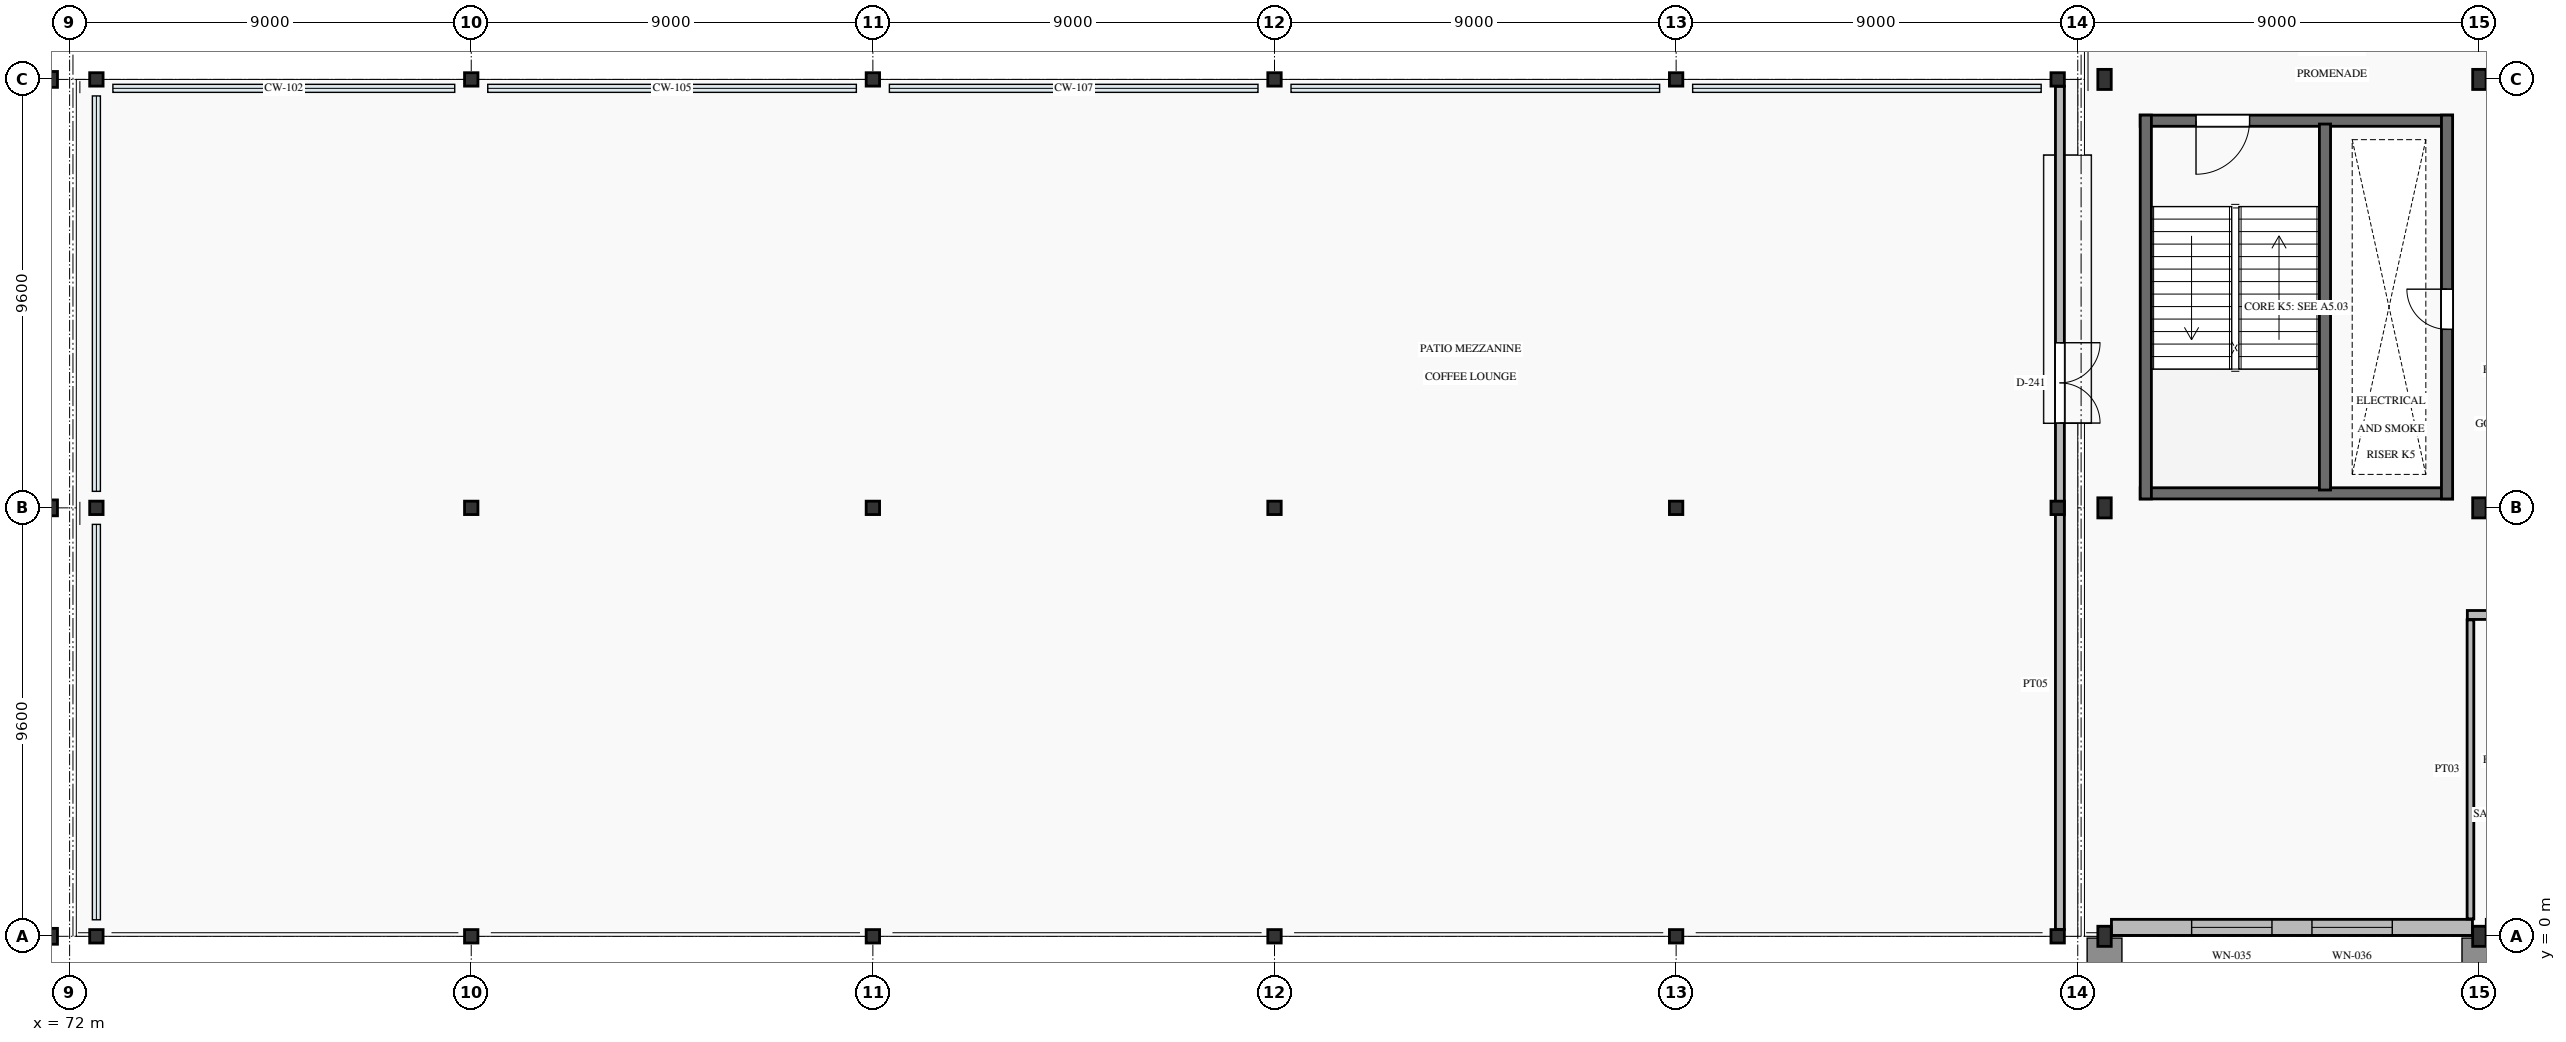
"""IFC4 building model, lengths in metres.
Left out: names, types, materials, properties, quantities, classifications, styles, units other than length and angle.
Written with IfcOpenShell. Run it as: python <this file> out.ifc"""

import sys

from ifc_helpers import new_model, si_unit, direction, frame, frame_2d, origin, origin_2d, place, context, subcontext, project, spatial, rectangle, hollow_circle, i_section, extrude, element, fill, save


model = new_model("IFC4")
c1 = context("Model", 3, precision=1e-05, world=origin(), true_north=direction((0.0, 1.0)))
c2 = subcontext(c1, "Body", "Model", "MODEL_VIEW")
j1 = project(units=[si_unit("LENGTHUNIT", "METRE"), si_unit("PLANEANGLEUNIT", "RADIAN")], contexts=[c1])
p1 = place(None, origin())
s1 = spatial("IfcSite", under=j1, at=p1, CompositionType="ELEMENT")
p2 = place(p1, origin())
s2 = spatial("IfcBuilding", under=s1, at=p2, CompositionType="ELEMENT")
p3 = place(p2, frame((0.0, 0.0, 6.0)))
s3 = spatial("IfcBuildingStorey", under=s2, at=p3, CompositionType="ELEMENT", Elevation=6.0)
for number, where, z_axis, x_axis in (
    (1, (71.55, 0.0, 0.0), (0.0, 0.0, 1.0), (1.0, 0.0, 0.0)),
    (2, (71.55, 9.6, 0.0), (0.0, 0.0, 1.0), (1.0, 0.0, 0.0)),
    (3, (71.55, 19.2, 0.0), (0.0, 0.0, 1.0), (1.0, 0.0, 0.0)),
):
    element("IfcColumn", number, at=place(p3, frame(where, z_axis=z_axis, x_axis=x_axis)), inside=s3, PredefinedType="COLUMN", context=c2, shape_type="SweptSolid", body=[
        extrude(hollow_circle(Radius=0.178, WallThickness=0.02, at=origin_2d()), origin(), (0.0, 0.0, 1.0), 4.68),
    ])
for number, where, z_axis, x_axis in (
    (4, (72.6, 0.0, 0.0), (0.0, 0.0, 1.0), (1.0, 0.0, 0.0)),
    (5, (72.6, 9.6, 0.0), (0.0, 0.0, 1.0), (1.0, 0.0, 0.0)),
    (6, (72.6, 19.2, 0.0), (0.0, 0.0, 1.0), (1.0, 0.0, 0.0)),
    (7, (81.0, 0.0, 0.0), (0.0, 0.0, 1.0), (1.0, 0.0, 0.0)),
    (8, (81.0, 9.6, 0.0), (0.0, 0.0, 1.0), (1.0, 0.0, 0.0)),
    (9, (81.0, 19.2, 0.0), (0.0, 0.0, 1.0), (1.0, 0.0, 0.0)),
    (10, (90.0, 0.0, 0.0), (0.0, 0.0, 1.0), (1.0, 0.0, 0.0)),
    (11, (90.0, 9.6, 0.0), (0.0, 0.0, 1.0), (1.0, 0.0, 0.0)),
    (12, (90.0, 19.2, 0.0), (0.0, 0.0, 1.0), (1.0, 0.0, 0.0)),
    (13, (99.0, 0.0, 0.0), (0.0, 0.0, 1.0), (1.0, 0.0, 0.0)),
    (14, (99.0, 9.6, 0.0), (0.0, 0.0, 1.0), (1.0, 0.0, 0.0)),
    (15, (99.0, 19.2, 0.0), (0.0, 0.0, 1.0), (1.0, 0.0, 0.0)),
    (16, (108.0, 0.0, 0.0), (0.0, 0.0, 1.0), (1.0, 0.0, 0.0)),
    (17, (108.0, 9.6, 0.0), (0.0, 0.0, 1.0), (1.0, 0.0, 0.0)),
    (18, (108.0, 19.2, 0.0), (0.0, 0.0, 1.0), (1.0, 0.0, 0.0)),
    (19, (116.55, 0.0, 0.0), (0.0, 0.0, 1.0), (1.0, 0.0, 0.0)),
    (20, (116.55, 9.6, 0.0), (0.0, 0.0, 1.0), (1.0, 0.0, 0.0)),
    (21, (116.55, 19.2, 0.0), (0.0, 0.0, 1.0), (1.0, 0.0, 0.0)),
):
    element("IfcColumn", number, at=place(p3, frame(where, z_axis=z_axis, x_axis=x_axis)), inside=s3, PredefinedType="COLUMN", context=c2, shape_type="SweptSolid", body=[
        extrude(i_section(OverallWidth=0.3, OverallDepth=0.3, WebThickness=0.011, FlangeThickness=0.019, FilletRadius=0.027, at=origin_2d()), origin(), (0.0, 0.0, 1.0), 4.8),
    ])
for number, where, z_axis, x_axis in (
    (22, (117.6, 0.0, 0.0), (0.0, 0.0, 1.0), (1.0, 0.0, 0.0)),
    (23, (117.6, 9.6, 0.0), (0.0, 0.0, 1.0), (1.0, 0.0, 0.0)),
    (24, (117.6, 19.2, 0.0), (0.0, 0.0, 1.0), (1.0, 0.0, 0.0)),
    (25, (126.0, 0.0, 0.0), (0.0, 0.0, 1.0), (1.0, 0.0, 0.0)),
    (26, (126.0, 9.6, 0.0), (0.0, 0.0, 1.0), (1.0, 0.0, 0.0)),
    (27, (126.0, 19.2, 0.0), (0.0, 0.0, 1.0), (1.0, 0.0, 0.0)),
):
    element("IfcColumn", number, at=place(p3, frame(where, z_axis=z_axis, x_axis=x_axis)), inside=s3, PredefinedType="COLUMN", context=c2, shape_type="SweptSolid", body=[
        extrude(i_section(OverallWidth=0.3, OverallDepth=0.45, WebThickness=0.014, FlangeThickness=0.026, FilletRadius=0.027, at=origin_2d()), origin(), (0.0, 0.0, 1.0), 4.8),
    ])
p4 = place(p3, frame((117.755, 0.2, 0.0), z_axis=(0.0, 0.0, 1.0), x_axis=(1.0, 0.0, 0.0)))
e28 = element("IfcWall", 28, at=p4, inside=s3, PredefinedType="SOLIDWALL", context=c2, shape_type="SweptSolid", body=[
    extrude(rectangle(XDim=8.09, YDim=0.36, at=frame_2d((4.045, 0.0))), origin(), (0.0, 0.0, 1.0), 4.23),
])
p5 = place(p4, frame((1.797, 0.0, 0.95)))
e29 = element("IfcOpeningElement", 29, at=p5, cuts=e28, PredefinedType="OPENING", context=c2, shape_type="SweptSolid", body=[
    extrude(rectangle(XDim=1.8, YDim=2.2, at=frame_2d((0.9, 1.1))), frame((0.0, 0.195, 0.0), z_axis=(0.0, -1.0, 0.0), x_axis=(1.0, 0.0, 0.0)), (0.0, 0.0, 1.0), 0.39),
])
p6 = place(p4, frame((4.493, 0.0, 0.95)))
e30 = element("IfcOpeningElement", 30, at=p6, cuts=e28, PredefinedType="OPENING", context=c2, shape_type="SweptSolid", body=[
    extrude(rectangle(XDim=1.8, YDim=2.2, at=frame_2d((0.9, 1.1))), frame((0.0, 0.195, 0.0), z_axis=(0.0, -1.0, 0.0), x_axis=(1.0, 0.0, 0.0)), (0.0, 0.0, 1.0), 0.39),
])
p7 = place(p3, frame((118.4, 9.925, 0.0), z_axis=(0.0, 0.0, 1.0), x_axis=(1.0, 0.0, 0.0)))
e31 = element("IfcWall", 31, at=p7, inside=s3, PredefinedType="SHEAR", context=c2, shape_type="SweptSolid", body=[
    extrude(rectangle(XDim=7.0, YDim=0.25, at=frame_2d((3.5, 0.0))), origin(), (0.0, 0.0, 1.0), 4.8),
])
p8 = place(p3, frame((118.4, 18.275, 0.0), z_axis=(0.0, 0.0, 1.0), x_axis=(1.0, 0.0, 0.0)))
e32 = element("IfcWall", 32, at=p8, inside=s3, PredefinedType="SHEAR", context=c2, shape_type="SweptSolid", body=[
    extrude(rectangle(XDim=7.0, YDim=0.25, at=frame_2d((3.5, 0.0))), origin(), (0.0, 0.0, 1.0), 4.8),
])
p9 = place(p8, frame((1.25, 0.0, 0.0)))
e33 = element("IfcOpeningElement", 33, at=p9, cuts=e32, PredefinedType="OPENING", context=c2, shape_type="SweptSolid", body=[
    extrude(rectangle(XDim=1.2, YDim=2.15, at=frame_2d((0.6, 1.075))), frame((0.0, 0.14, 0.0), z_axis=(0.0, -1.0, 0.0), x_axis=(1.0, 0.0, 0.0)), (0.0, 0.0, 1.0), 0.28),
])
p10 = place(p3, frame((118.525, 9.8, 0.0), z_axis=(0.0, 0.0, 1.0), x_axis=(0.0, 1.0, 0.0)))
e34 = element("IfcWall", 34, at=p10, inside=s3, PredefinedType="SHEAR", context=c2, shape_type="SweptSolid", body=[
    extrude(rectangle(XDim=8.6, YDim=0.25, at=frame_2d((4.3, 0.0))), origin(), (0.0, 0.0, 1.0), 4.8),
])
p11 = place(p3, frame((125.275, 9.8, 0.0), z_axis=(0.0, 0.0, 1.0), x_axis=(0.0, 1.0, 0.0)))
e35 = element("IfcWall", 35, at=p11, inside=s3, PredefinedType="SHEAR", context=c2, shape_type="SweptSolid", body=[
    extrude(rectangle(XDim=8.6, YDim=0.25, at=frame_2d((4.3, 0.0))), origin(), (0.0, 0.0, 1.0), 4.8),
])
p12 = place(p11, frame((3.8, 0.0, 0.0)))
e36 = element("IfcOpeningElement", 36, at=p12, cuts=e35, PredefinedType="OPENING", context=c2, shape_type="SweptSolid", body=[
    extrude(rectangle(XDim=0.9, YDim=2.05, at=frame_2d((0.45, 1.025))), frame((0.0, 0.14, 0.0), z_axis=(0.0, -1.0, 0.0), x_axis=(1.0, 0.0, 0.0)), (0.0, 0.0, 1.0), 0.28),
])
p13 = place(p3, frame((122.54, 10.0, 0.0), z_axis=(0.0, 0.0, 1.0), x_axis=(0.0, 1.0, 0.0)))
e37 = element("IfcWall", 37, at=p13, inside=s3, PredefinedType="SHEAR", context=c2, shape_type="SweptSolid", body=[
    extrude(rectangle(XDim=8.2, YDim=0.25, at=frame_2d((4.1, 0.0))), origin(), (0.0, 0.0, 1.0), 4.8),
])
p14 = place(p3, frame((116.6, 0.155, 0.0), z_axis=(0.0, 0.0, 1.0), x_axis=(0.0, 1.0, 0.0)))
e38 = element("IfcWall", 38, at=p14, inside=s3, PredefinedType="PARTITIONING", context=c2, shape_type="SweptSolid", body=[
    extrude(rectangle(XDim=18.89, YDim=0.2, at=frame_2d((9.445, 0.0))), origin(), (0.0, 0.0, 1.0), 4.215),
])
p15 = place(p14, frame((11.345, 0.0, 0.0)))
e39 = element("IfcOpeningElement", 39, at=p15, cuts=e38, PredefinedType="OPENING", context=c2, shape_type="SweptSolid", body=[
    extrude(rectangle(XDim=1.8, YDim=2.3, at=frame_2d((0.9, 1.15))), frame((0.0, 0.115, 0.0), z_axis=(0.0, -1.0, 0.0), x_axis=(1.0, 0.0, 0.0)), (0.0, 0.0, 1.0), 0.23),
])
p16 = place(p3, frame((125.73, 7.2, 0.0), z_axis=(0.0, 0.0, 1.0), x_axis=(1.0, 0.0, 0.0)))
e40 = element("IfcWall", 40, at=p16, inside=s3, PredefinedType="PARTITIONING", context=c2, shape_type="SweptSolid", body=[
    extrude(rectangle(XDim=4.35, YDim=0.2, at=frame_2d((2.175, 0.0))), origin(), (0.0, 0.0, 1.0), 4.53),
])
p17 = place(p16, frame((1.695, 0.0, 0.0)))
e41 = element("IfcOpeningElement", 41, at=p17, cuts=e40, PredefinedType="OPENING", context=c2, shape_type="SweptSolid", body=[
    extrude(rectangle(XDim=0.95, YDim=2.1, at=frame_2d((0.475, 1.05))), frame((0.0, 0.115, 0.0), z_axis=(0.0, -1.0, 0.0), x_axis=(1.0, 0.0, 0.0)), (0.0, 0.0, 1.0), 0.23),
])
p18 = place(p3, frame((125.8, 0.39, 0.0), z_axis=(0.0, 0.0, 1.0), x_axis=(0.0, 1.0, 0.0)))
e42 = element("IfcWall", 42, at=p18, inside=s3, PredefinedType="PARTITIONING", context=c2, shape_type="SweptSolid", body=[
    extrude(rectangle(XDim=6.7, YDim=0.15, at=frame_2d((3.35, 0.0))), origin(), (0.0, 0.0, 1.0), 3.93),
])
p19 = place(p5, origin())
e43 = element("IfcWindow", 43, at=p19, inside=s3, PartitioningType="SINGLE_PANEL", PredefinedType="WINDOW", context=c2, shape_type="SweptSolid", body=[
    extrude(rectangle(XDim=1.8, YDim=2.2, at=frame_2d((0.9, 1.1))), frame((0.0, 0.03, 0.0), z_axis=(0.0, -1.0, 0.0), x_axis=(1.0, 0.0, 0.0)), (0.0, 0.0, 1.0), 0.06),
])
fill(e29, e43)
p20 = place(p6, origin())
e44 = element("IfcWindow", 44, at=p20, inside=s3, PartitioningType="SINGLE_PANEL", PredefinedType="WINDOW", context=c2, shape_type="SweptSolid", body=[
    extrude(rectangle(XDim=1.8, YDim=2.2, at=frame_2d((0.9, 1.1))), frame((0.0, 0.03, 0.0), z_axis=(0.0, -1.0, 0.0), x_axis=(1.0, 0.0, 0.0)), (0.0, 0.0, 1.0), 0.06),
])
fill(e30, e44)
p21 = place(p9, frame((1.2, 0.0, 0.0), z_axis=(0.0, 0.0, 1.0), x_axis=(-1.0, 0.0, 0.0)))
e45 = element("IfcDoor", 45, at=p21, inside=s3, OperationType="SINGLE_SWING_LEFT", PredefinedType="DOOR", context=c2, shape_type="SweptSolid", body=[
    extrude(rectangle(XDim=1.2, YDim=2.15, at=frame_2d((0.6, 1.075))), frame((0.0, 0.025, 0.0), z_axis=(0.0, -1.0, 0.0), x_axis=(1.0, 0.0, 0.0)), (0.0, 0.0, 1.0), 0.05),
])
fill(e33, e45)
p22 = place(p12, origin())
e46 = element("IfcDoor", 46, at=p22, inside=s3, OperationType="SINGLE_SWING_RIGHT", PredefinedType="DOOR", context=c2, shape_type="SweptSolid", body=[
    extrude(rectangle(XDim=0.9, YDim=2.05, at=frame_2d((0.45, 1.025))), frame((0.0, 0.025, 0.0), z_axis=(0.0, -1.0, 0.0), x_axis=(1.0, 0.0, 0.0)), (0.0, 0.0, 1.0), 0.05),
])
fill(e36, e46)
p23 = place(p15, frame((1.8, 0.0, 0.0), z_axis=(0.0, 0.0, 1.0), x_axis=(-1.0, 0.0, 0.0)))
e47 = element("IfcDoor", 47, at=p23, inside=s3, OperationType="DOUBLE_DOOR_SINGLE_SWING", PredefinedType="DOOR", context=c2, shape_type="SweptSolid", body=[
    extrude(rectangle(XDim=1.8, YDim=2.3, at=frame_2d((0.9, 1.15))), frame((0.0, 0.025, 0.0), z_axis=(0.0, -1.0, 0.0), x_axis=(1.0, 0.0, 0.0)), (0.0, 0.0, 1.0), 0.05),
])
fill(e39, e47)
save(model, sys.argv[1])
